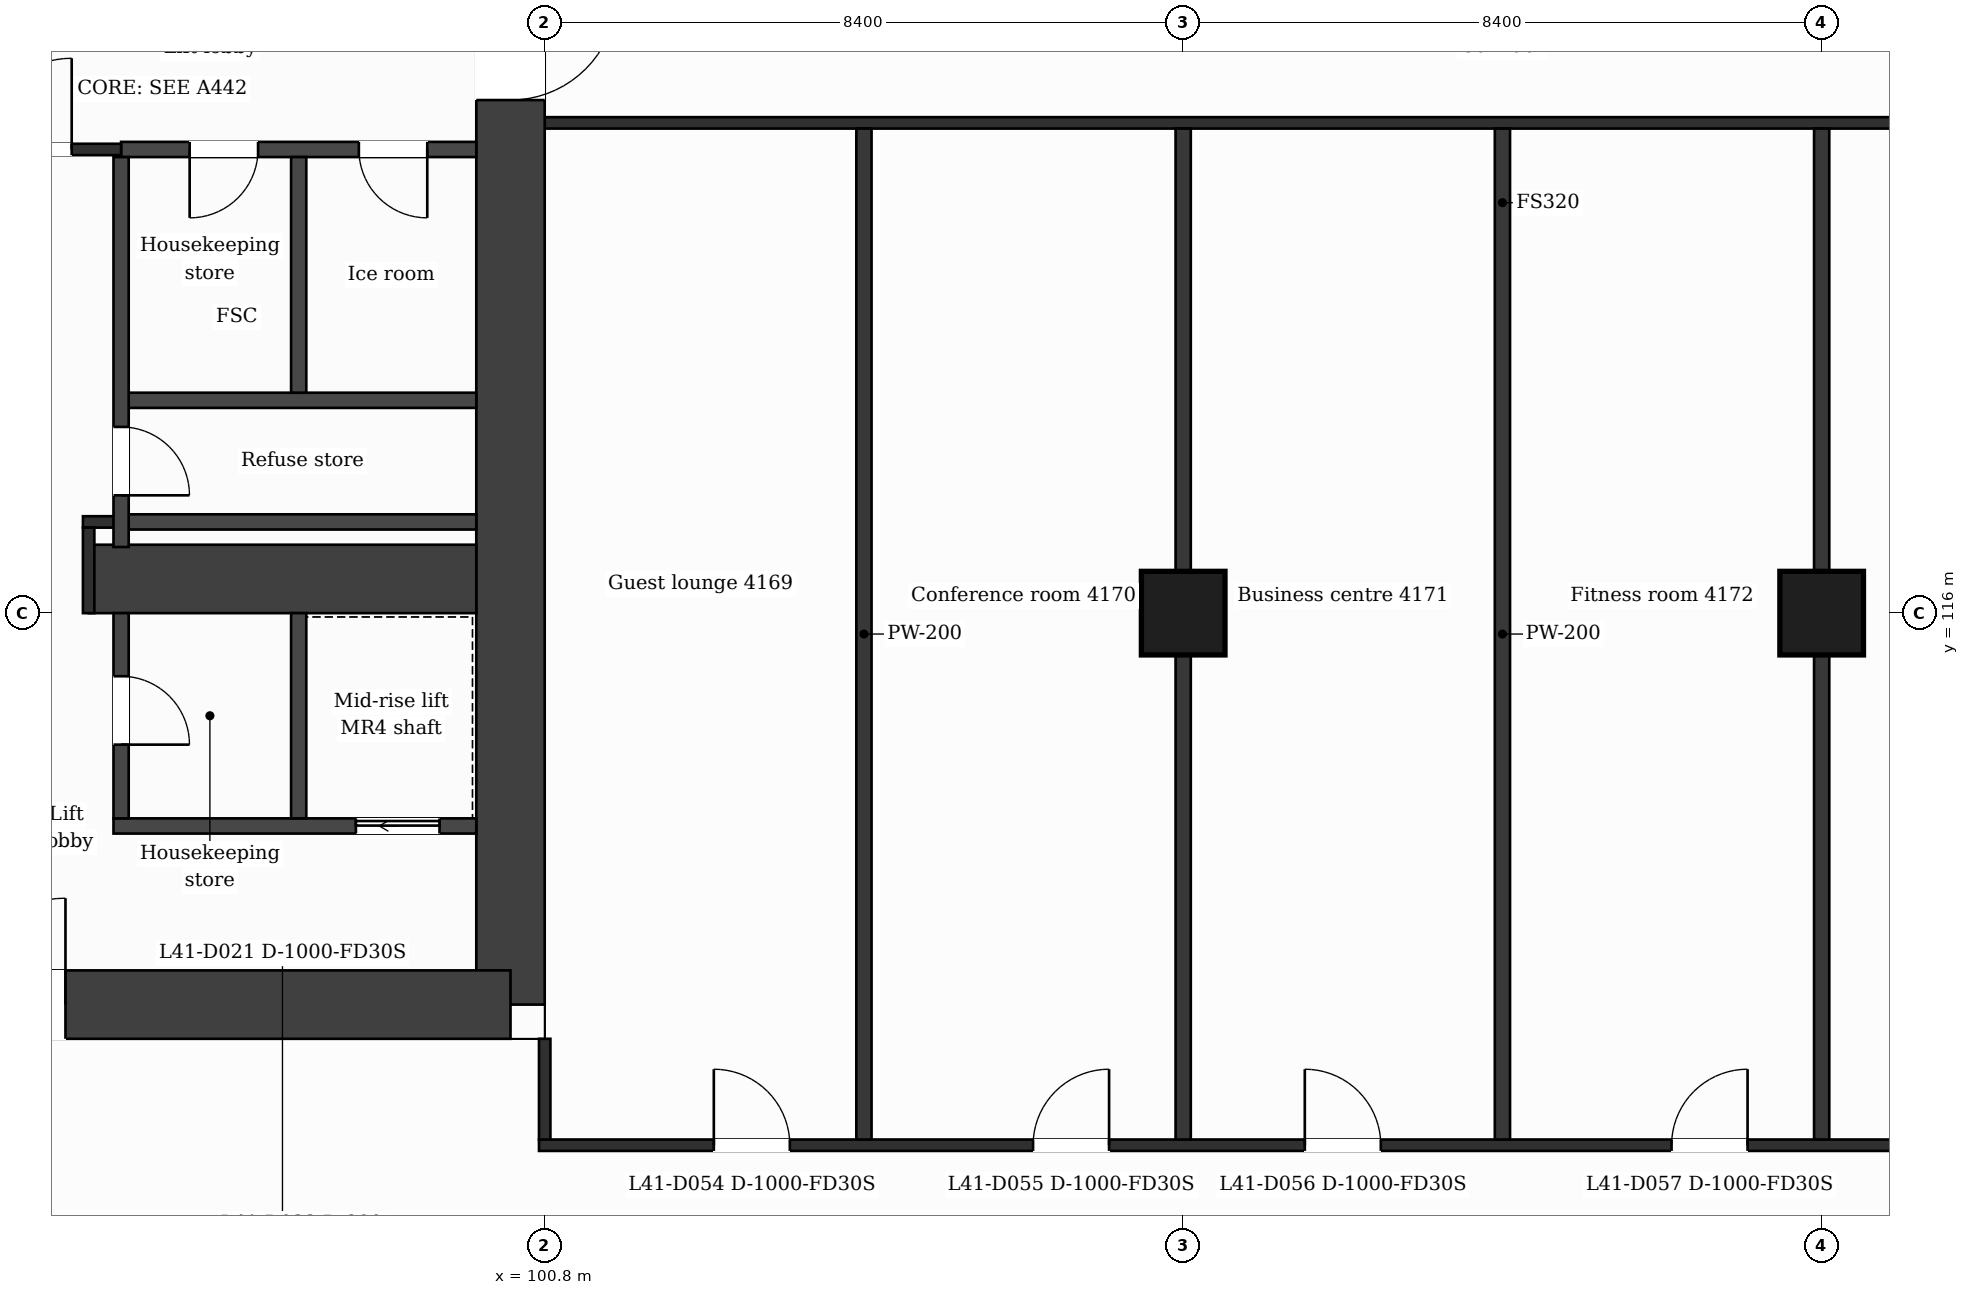
"""IFC4 building model, lengths in metres.
Left out: names, types, materials, properties, quantities, classifications, styles, units other than length and angle.
Written with IfcOpenShell. Run it as: python <this file> out.ifc"""

import sys

from ifc_helpers import new_model, si_unit, direction, frame, frame_2d, origin, origin_2d, place, context, subcontext, project, spatial, rectangle, extrude, element, fill, save


model = new_model("IFC4")
c1 = context("Model", 3, precision=1e-05, world=origin(), true_north=direction((0.0, 1.0)))
c2 = subcontext(c1, "Body", "Model", "MODEL_VIEW")
j1 = project(units=[si_unit("LENGTHUNIT", "METRE"), si_unit("PLANEANGLEUNIT", "RADIAN")], contexts=[c1])
p1 = place(None, origin())
s1 = spatial("IfcSite", under=j1, at=p1, CompositionType="ELEMENT")
p2 = place(p1, origin())
s2 = spatial("IfcBuilding", under=s1, at=p2, CompositionType="ELEMENT")
p3 = place(p2, frame((0.0, 0.0, 173.7)))
s3 = spatial("IfcBuildingStorey", under=s2, at=p3, CompositionType="ELEMENT", Elevation=173.7)
p4 = place(p3, frame((100.35, 131.95, 0.0), z_axis=(0.0, 0.0, 1.0), x_axis=(0.0, -1.0, 0.0)))
e1 = element("IfcWall", 1, at=p4, inside=s3, PredefinedType="SHEAR", context=c2, shape_type="SweptSolid", body=[
    extrude(rectangle(XDim=21.1, YDim=0.9, at=frame_2d((10.55, 0.0))), origin(), (0.0, 0.0, 1.0), 3.7),
])
p5 = place(p4, frame((7.8, 0.0, 0.0)))
e2 = element("IfcOpeningElement", 2, at=p5, cuts=e1, PredefinedType="OPENING", context=c2, shape_type="SweptSolid", body=[
    extrude(rectangle(XDim=1.4, YDim=2.1, at=frame_2d((0.7, 1.05))), frame((0.0, 0.46, 0.0), z_axis=(0.0, -1.0, 0.0), x_axis=(1.0, 0.0, 0.0)), (0.0, 0.0, 1.0), 0.92),
])
p6 = place(p3, frame((100.35, 110.85, 0.0), z_axis=(0.0, 0.0, 1.0), x_axis=(-1.0, 0.0, 0.0)))
e3 = element("IfcWall", 3, at=p6, inside=s3, PredefinedType="SHEAR", context=c2, shape_type="SweptSolid", body=[
    extrude(rectangle(XDim=14.166, YDim=0.9, at=frame_2d((7.083, 0.0))), origin(), (0.0, 0.0, 1.0), 3.7),
])
p7 = place(p6, frame((5.855, 0.0, 0.0)))
e4 = element("IfcOpeningElement", 4, at=p7, cuts=e3, PredefinedType="OPENING", context=c2, shape_type="SweptSolid", body=[
    extrude(rectangle(XDim=1.4, YDim=2.1, at=frame_2d((0.7, 1.05))), frame((0.0, 0.46, 0.0), z_axis=(0.0, -1.0, 0.0), x_axis=(1.0, 0.0, 0.0)), (0.0, 0.0, 1.0), 0.92),
])
p8 = place(p3, frame((94.8, 116.45, 0.0), z_axis=(0.0, 0.0, 1.0), x_axis=(1.0, 0.0, 0.0)))
e5 = element("IfcWall", 5, at=p8, inside=s3, PredefinedType="SHEAR", context=c2, shape_type="SweptSolid", body=[
    extrude(rectangle(XDim=5.1, YDim=0.9, at=frame_2d((2.55, 0.0))), origin(), (0.0, 0.0, 1.0), 3.7),
])
for number, where, z_axis, x_axis in (
    (6, (109.2, 116.0, 0.0), (0.0, 0.0, 1.0), (1.0, 0.0, 0.0)),
    (7, (117.6, 116.0, 0.0), (0.0, 0.0, 1.0), (1.0, 0.0, 0.0)),
):
    element("IfcColumn", number, at=place(p3, frame(where, z_axis=z_axis, x_axis=x_axis)), inside=s3, PredefinedType="COLUMN", context=c2, shape_type="SweptSolid", body=[
        extrude(rectangle(XDim=1.1, YDim=1.1, at=origin_2d()), origin(), (0.0, 0.0, 1.0), 3.7),
    ])
p9 = place(p3, frame((100.725, 109.0, 0.0), z_axis=(0.0, 0.0, 1.0), x_axis=(1.0, 0.0, 0.0)))
e8 = element("IfcWall", 8, at=p9, inside=s3, PredefinedType="PARTITIONING", context=c2, shape_type="SweptSolid", body=[
    extrude(rectangle(XDim=25.35, YDim=0.15, at=frame_2d((12.675, 0.0))), origin(), (0.0, 0.0, 1.0), 3.38),
])
p10 = place(p9, frame((2.3, 0.0, 0.0)))
e9 = element("IfcOpeningElement", 9, at=p10, cuts=e8, PredefinedType="OPENING", context=c2, shape_type="SweptSolid", body=[
    extrude(rectangle(XDim=1.0, YDim=2.1, at=frame_2d((0.5, 1.05))), frame((0.0, 0.085, 0.0), z_axis=(0.0, -1.0, 0.0), x_axis=(1.0, 0.0, 0.0)), (0.0, 0.0, 1.0), 0.17),
])
p11 = place(p9, frame((6.5, 0.0, 0.0)))
e10 = element("IfcOpeningElement", 10, at=p11, cuts=e8, PredefinedType="OPENING", context=c2, shape_type="SweptSolid", body=[
    extrude(rectangle(XDim=1.0, YDim=2.1, at=frame_2d((0.5, 1.05))), frame((0.0, 0.085, 0.0), z_axis=(0.0, -1.0, 0.0), x_axis=(1.0, 0.0, 0.0)), (0.0, 0.0, 1.0), 0.17),
])
p12 = place(p9, frame((10.075, 0.0, 0.0)))
e11 = element("IfcOpeningElement", 11, at=p12, cuts=e8, PredefinedType="OPENING", context=c2, shape_type="SweptSolid", body=[
    extrude(rectangle(XDim=1.0, YDim=2.1, at=frame_2d((0.5, 1.05))), frame((0.0, 0.085, 0.0), z_axis=(0.0, -1.0, 0.0), x_axis=(1.0, 0.0, 0.0)), (0.0, 0.0, 1.0), 0.17),
])
p13 = place(p9, frame((14.9, 0.0, 0.0)))
e12 = element("IfcOpeningElement", 12, at=p13, cuts=e8, PredefinedType="OPENING", context=c2, shape_type="SweptSolid", body=[
    extrude(rectangle(XDim=1.0, YDim=2.1, at=frame_2d((0.5, 1.05))), frame((0.0, 0.085, 0.0), z_axis=(0.0, -1.0, 0.0), x_axis=(1.0, 0.0, 0.0)), (0.0, 0.0, 1.0), 0.17),
])
p14 = place(p9, frame((22.25, 0.0, 0.0)))
e13 = element("IfcOpeningElement", 13, at=p14, cuts=e8, PredefinedType="OPENING", context=c2, shape_type="SweptSolid", body=[
    extrude(rectangle(XDim=1.0, YDim=2.1, at=frame_2d((0.5, 1.05))), frame((0.0, 0.085, 0.0), z_axis=(0.0, -1.0, 0.0), x_axis=(1.0, 0.0, 0.0)), (0.0, 0.0, 1.0), 0.17),
])
p15 = place(p3, frame((95.127, 113.2, 0.0), z_axis=(0.0, 0.0, 1.0), x_axis=(1.0, 0.0, 0.0)))
e14 = element("IfcWall", 14, at=p15, inside=s3, PredefinedType="PARTITIONING", context=c2, shape_type="SweptSolid", body=[
    extrude(rectangle(XDim=4.773, YDim=0.2, at=frame_2d((2.386, 0.0))), origin(), (0.0, 0.0, 1.0), 3.38),
])
p16 = place(p15, frame((3.189, 0.0, 0.0)))
e15 = element("IfcOpeningElement", 15, at=p16, cuts=e14, PredefinedType="OPENING", context=c2, shape_type="SweptSolid", body=[
    extrude(rectangle(XDim=1.1, YDim=2.1, at=frame_2d((0.55, 1.05))), frame((0.0, 0.11, 0.0), z_axis=(0.0, -1.0, 0.0), x_axis=(1.0, 0.0, 0.0)), (0.0, 0.0, 1.0), 0.22),
])
p17 = place(p3, frame((95.227, 117.2, 0.0), z_axis=(0.0, 0.0, 1.0), x_axis=(1.0, 0.0, 0.0)))
e16 = element("IfcWall", 16, at=p17, inside=s3, PredefinedType="PARTITIONING", context=c2, shape_type="SweptSolid", body=[
    extrude(rectangle(XDim=4.673, YDim=0.2, at=frame_2d((2.336, 0.0))), origin(), (0.0, 0.0, 1.0), 3.38),
])
p18 = place(p3, frame((94.725, 117.2, 0.0), z_axis=(0.0, 0.0, 1.0), x_axis=(1.0, 0.0, 0.0)))
e17 = element("IfcWall", 17, at=p18, inside=s3, PredefinedType="PARTITIONING", context=c2, shape_type="SweptSolid", body=[
    extrude(rectangle(XDim=0.502, YDim=0.15, at=frame_2d((0.251, 0.0))), origin(), (0.0, 0.0, 1.0), 3.38),
])
p19 = place(p3, frame((95.227, 118.8, 0.0), z_axis=(0.0, 0.0, 1.0), x_axis=(1.0, 0.0, 0.0)))
e18 = element("IfcWall", 18, at=p19, inside=s3, PredefinedType="PARTITIONING", context=c2, shape_type="SweptSolid", body=[
    extrude(rectangle(XDim=4.673, YDim=0.2, at=frame_2d((2.336, 0.0))), origin(), (0.0, 0.0, 1.0), 3.38),
])
p20 = place(p3, frame((95.227, 122.1, 0.0), z_axis=(0.0, 0.0, 1.0), x_axis=(1.0, 0.0, 0.0)))
e19 = element("IfcWall", 19, at=p20, inside=s3, PredefinedType="PARTITIONING", context=c2, shape_type="SweptSolid", body=[
    extrude(rectangle(XDim=4.673, YDim=0.2, at=frame_2d((2.336, 0.0))), origin(), (0.0, 0.0, 1.0), 3.38),
])
p21 = place(p20, frame((0.902, 0.0, 0.0)))
e20 = element("IfcOpeningElement", 20, at=p21, cuts=e19, PredefinedType="OPENING", context=c2, shape_type="SweptSolid", body=[
    extrude(rectangle(XDim=0.9, YDim=2.1, at=frame_2d((0.45, 1.05))), frame((0.0, 0.11, 0.0), z_axis=(0.0, -1.0, 0.0), x_axis=(1.0, 0.0, 0.0)), (0.0, 0.0, 1.0), 0.22),
])
p22 = place(p20, frame((3.128, 0.0, 0.0)))
e21 = element("IfcOpeningElement", 21, at=p22, cuts=e19, PredefinedType="OPENING", context=c2, shape_type="SweptSolid", body=[
    extrude(rectangle(XDim=0.9, YDim=2.1, at=frame_2d((0.45, 1.05))), frame((0.0, 0.11, 0.0), z_axis=(0.0, -1.0, 0.0), x_axis=(1.0, 0.0, 0.0)), (0.0, 0.0, 1.0), 0.22),
])
p23 = place(p3, frame((92.827, 122.1, 0.0), z_axis=(0.0, 0.0, 1.0), x_axis=(1.0, 0.0, 0.0)))
e22 = element("IfcWall", 22, at=p23, inside=s3, PredefinedType="PARTITIONING", context=c2, shape_type="SweptSolid", body=[
    extrude(rectangle(XDim=2.4, YDim=0.15, at=frame_2d((1.2, 0.0))), origin(), (0.0, 0.0, 1.0), 3.38),
])
p24 = place(p23, frame((0.55, 0.0, 0.0)))
e23 = element("IfcOpeningElement", 23, at=p24, cuts=e22, PredefinedType="OPENING", context=c2, shape_type="SweptSolid", body=[
    extrude(rectangle(XDim=1.2, YDim=2.1, at=frame_2d((0.6, 1.05))), frame((0.0, 0.085, 0.0), z_axis=(0.0, -1.0, 0.0), x_axis=(1.0, 0.0, 0.0)), (0.0, 0.0, 1.0), 0.17),
])
p25 = place(p3, frame((100.8, 122.45, 0.0), z_axis=(0.0, 0.0, 1.0), x_axis=(1.0, 0.0, 0.0)))
e24 = element("IfcWall", 24, at=p25, inside=s3, PredefinedType="PARTITIONING", context=c2, shape_type="SweptSolid", body=[
    extrude(rectangle(XDim=25.2, YDim=0.15, at=frame_2d((12.6, 0.0))), origin(), (0.0, 0.0, 1.0), 3.38),
])
p26 = place(p3, frame((94.8, 116.0, 0.0), z_axis=(0.0, 0.0, 1.0), x_axis=(0.0, 1.0, 0.0)))
e25 = element("IfcWall", 25, at=p26, inside=s3, PredefinedType="PARTITIONING", context=c2, shape_type="SweptSolid", body=[
    extrude(rectangle(XDim=1.125, YDim=0.15, at=frame_2d((0.562, 0.0))), origin(), (0.0, 0.0, 1.0), 3.38),
])
p27 = place(p3, frame((95.227, 113.3, 0.0), z_axis=(0.0, 0.0, 1.0), x_axis=(0.0, 1.0, 0.0)))
e26 = element("IfcWall", 26, at=p27, inside=s3, PredefinedType="PARTITIONING", context=c2, shape_type="SweptSolid", body=[
    extrude(rectangle(XDim=2.7, YDim=0.2, at=frame_2d((1.35, 0.0))), origin(), (0.0, 0.0, 1.0), 3.38),
])
p28 = place(p27, frame((0.97, 0.0, 0.0)))
e27 = element("IfcOpeningElement", 27, at=p28, cuts=e26, PredefinedType="OPENING", context=c2, shape_type="SweptSolid", body=[
    extrude(rectangle(XDim=0.9, YDim=2.1, at=frame_2d((0.45, 1.05))), frame((0.0, 0.11, 0.0), z_axis=(0.0, -1.0, 0.0), x_axis=(1.0, 0.0, 0.0)), (0.0, 0.0, 1.0), 0.22),
])
p29 = place(p3, frame((95.227, 116.87, 0.0), z_axis=(0.0, 0.0, 1.0), x_axis=(0.0, 1.0, 0.0)))
e28 = element("IfcWall", 28, at=p29, inside=s3, PredefinedType="PARTITIONING", context=c2, shape_type="SweptSolid", body=[
    extrude(rectangle(XDim=5.13, YDim=0.2, at=frame_2d((2.565, 0.0))), origin(), (0.0, 0.0, 1.0), 3.38),
])
p30 = place(p29, frame((0.68, 0.0, 0.0)))
e29 = element("IfcOpeningElement", 29, at=p30, cuts=e28, PredefinedType="OPENING", context=c2, shape_type="SweptSolid", body=[
    extrude(rectangle(XDim=0.9, YDim=2.1, at=frame_2d((0.45, 1.05))), frame((0.0, 0.11, 0.0), z_axis=(0.0, -1.0, 0.0), x_axis=(1.0, 0.0, 0.0)), (0.0, 0.0, 1.0), 0.22),
])
p31 = place(p3, frame((97.563, 113.3, 0.0), z_axis=(0.0, 0.0, 1.0), x_axis=(0.0, 1.0, 0.0)))
e30 = element("IfcWall", 30, at=p31, inside=s3, PredefinedType="PARTITIONING", context=c2, shape_type="SweptSolid", body=[
    extrude(rectangle(XDim=2.7, YDim=0.2, at=frame_2d((1.35, 0.0))), origin(), (0.0, 0.0, 1.0), 3.38),
])
p32 = place(p3, frame((97.563, 118.9, 0.0), z_axis=(0.0, 0.0, 1.0), x_axis=(0.0, 1.0, 0.0)))
e31 = element("IfcWall", 31, at=p32, inside=s3, PredefinedType="PARTITIONING", context=c2, shape_type="SweptSolid", body=[
    extrude(rectangle(XDim=3.1, YDim=0.2, at=frame_2d((1.55, 0.0))), origin(), (0.0, 0.0, 1.0), 3.38),
])
p33 = place(p3, frame((100.8, 109.075, 0.0), z_axis=(0.0, 0.0, 1.0), x_axis=(0.0, 1.0, 0.0)))
e32 = element("IfcWall", 32, at=p33, inside=s3, PredefinedType="PARTITIONING", context=c2, shape_type="SweptSolid", body=[
    extrude(rectangle(XDim=1.325, YDim=0.15, at=frame_2d((0.663, 0.0))), origin(), (0.0, 0.0, 1.0), 3.38),
])
for number, where, z_axis, x_axis in (
    (33, (105.0, 109.075, 0.0), (0.0, 0.0, 1.0), (0.0, 1.0, 0.0)),
    (34, (109.2, 109.075, 0.0), (0.0, 0.0, 1.0), (0.0, 1.0, 0.0)),
    (35, (113.4, 109.075, 0.0), (0.0, 0.0, 1.0), (0.0, 1.0, 0.0)),
    (36, (117.6, 109.075, 0.0), (0.0, 0.0, 1.0), (0.0, 1.0, 0.0)),
):
    element("IfcWall", number, at=place(p3, frame(where, z_axis=z_axis, x_axis=x_axis)), inside=s3, PredefinedType="PARTITIONING", context=c2, shape_type="SweptSolid", body=[
        extrude(rectangle(XDim=13.3, YDim=0.2, at=frame_2d((6.65, 0.0))), origin(), (0.0, 0.0, 1.0), 3.38),
    ])
p34 = place(p24, origin())
e37 = element("IfcDoor", 37, at=p34, inside=s3, OperationType="SINGLE_SWING_RIGHT", PredefinedType="DOOR", context=c2, shape_type="SweptSolid", body=[
    extrude(rectangle(XDim=1.2, YDim=2.1, at=frame_2d((0.6, 1.05))), frame((0.0, 0.025, 0.0), z_axis=(0.0, -1.0, 0.0), x_axis=(1.0, 0.0, 0.0)), (0.0, 0.0, 1.0), 0.05),
])
fill(e23, e37)
p35 = place(p21, origin())
e38 = element("IfcDoor", 38, at=p35, inside=s3, OperationType="SINGLE_SWING_LEFT", PredefinedType="DOOR", context=c2, shape_type="SweptSolid", body=[
    extrude(rectangle(XDim=0.9, YDim=2.1, at=frame_2d((0.45, 1.05))), frame((0.0, 0.025, 0.0), z_axis=(0.0, -1.0, 0.0), x_axis=(1.0, 0.0, 0.0)), (0.0, 0.0, 1.0), 0.05),
])
fill(e20, e38)
p36 = place(p22, origin())
e39 = element("IfcDoor", 39, at=p36, inside=s3, OperationType="SINGLE_SWING_RIGHT", PredefinedType="DOOR", context=c2, shape_type="SweptSolid", body=[
    extrude(rectangle(XDim=0.9, YDim=2.1, at=frame_2d((0.45, 1.05))), frame((0.0, 0.025, 0.0), z_axis=(0.0, -1.0, 0.0), x_axis=(1.0, 0.0, 0.0)), (0.0, 0.0, 1.0), 0.05),
])
fill(e21, e39)
p37 = place(p30, origin())
e40 = element("IfcDoor", 40, at=p37, inside=s3, OperationType="SINGLE_SWING_LEFT", PredefinedType="DOOR", context=c2, shape_type="SweptSolid", body=[
    extrude(rectangle(XDim=0.9, YDim=2.1, at=frame_2d((0.45, 1.05))), frame((0.0, 0.025, 0.0), z_axis=(0.0, -1.0, 0.0), x_axis=(1.0, 0.0, 0.0)), (0.0, 0.0, 1.0), 0.05),
])
fill(e29, e40)
p38 = place(p16, origin())
e41 = element("IfcDoor", 41, at=p38, inside=s3, OperationType="SLIDING_TO_LEFT", PredefinedType="DOOR", context=c2, shape_type="SweptSolid", body=[
    extrude(rectangle(XDim=1.1, YDim=2.1, at=frame_2d((0.55, 1.05))), frame((0.0, 0.025, 0.0), z_axis=(0.0, -1.0, 0.0), x_axis=(1.0, 0.0, 0.0)), (0.0, 0.0, 1.0), 0.05),
])
fill(e15, e41)
p39 = place(p28, origin())
e42 = element("IfcDoor", 42, at=p39, inside=s3, OperationType="SINGLE_SWING_LEFT", PredefinedType="DOOR", context=c2, shape_type="SweptSolid", body=[
    extrude(rectangle(XDim=0.9, YDim=2.1, at=frame_2d((0.45, 1.05))), frame((0.0, 0.025, 0.0), z_axis=(0.0, -1.0, 0.0), x_axis=(1.0, 0.0, 0.0)), (0.0, 0.0, 1.0), 0.05),
])
fill(e27, e42)
p40 = place(p10, origin())
e43 = element("IfcDoor", 43, at=p40, inside=s3, OperationType="SINGLE_SWING_LEFT", PredefinedType="DOOR", context=c2, shape_type="SweptSolid", body=[
    extrude(rectangle(XDim=1.0, YDim=2.1, at=frame_2d((0.5, 1.05))), frame((0.0, 0.025, 0.0), z_axis=(0.0, -1.0, 0.0), x_axis=(1.0, 0.0, 0.0)), (0.0, 0.0, 1.0), 0.05),
])
fill(e9, e43)
p41 = place(p11, origin())
e44 = element("IfcDoor", 44, at=p41, inside=s3, OperationType="SINGLE_SWING_RIGHT", PredefinedType="DOOR", context=c2, shape_type="SweptSolid", body=[
    extrude(rectangle(XDim=1.0, YDim=2.1, at=frame_2d((0.5, 1.05))), frame((0.0, 0.025, 0.0), z_axis=(0.0, -1.0, 0.0), x_axis=(1.0, 0.0, 0.0)), (0.0, 0.0, 1.0), 0.05),
])
fill(e10, e44)
p42 = place(p12, origin())
e45 = element("IfcDoor", 45, at=p42, inside=s3, OperationType="SINGLE_SWING_LEFT", PredefinedType="DOOR", context=c2, shape_type="SweptSolid", body=[
    extrude(rectangle(XDim=1.0, YDim=2.1, at=frame_2d((0.5, 1.05))), frame((0.0, 0.025, 0.0), z_axis=(0.0, -1.0, 0.0), x_axis=(1.0, 0.0, 0.0)), (0.0, 0.0, 1.0), 0.05),
])
fill(e11, e45)
p43 = place(p13, origin())
e46 = element("IfcDoor", 46, at=p43, inside=s3, OperationType="SINGLE_SWING_RIGHT", PredefinedType="DOOR", context=c2, shape_type="SweptSolid", body=[
    extrude(rectangle(XDim=1.0, YDim=2.1, at=frame_2d((0.5, 1.05))), frame((0.0, 0.025, 0.0), z_axis=(0.0, -1.0, 0.0), x_axis=(1.0, 0.0, 0.0)), (0.0, 0.0, 1.0), 0.05),
])
fill(e12, e46)
p44 = place(p7, origin())
e47 = element("IfcDoor", 47, at=p44, inside=s3, OperationType="SINGLE_SWING_LEFT", PredefinedType="DOOR", context=c2, shape_type="SweptSolid", body=[
    extrude(rectangle(XDim=1.4, YDim=2.1, at=frame_2d((0.7, 1.05))), frame((0.0, 0.025, 0.0), z_axis=(0.0, -1.0, 0.0), x_axis=(1.0, 0.0, 0.0)), (0.0, 0.0, 1.0), 0.05),
])
fill(e4, e47)
p45 = place(p5, origin())
e48 = element("IfcDoor", 48, at=p45, inside=s3, OperationType="SINGLE_SWING_LEFT", PredefinedType="DOOR", context=c2, shape_type="SweptSolid", body=[
    extrude(rectangle(XDim=1.4, YDim=2.1, at=frame_2d((0.7, 1.05))), frame((0.0, 0.025, 0.0), z_axis=(0.0, -1.0, 0.0), x_axis=(1.0, 0.0, 0.0)), (0.0, 0.0, 1.0), 0.05),
])
fill(e2, e48)
save(model, sys.argv[1])
